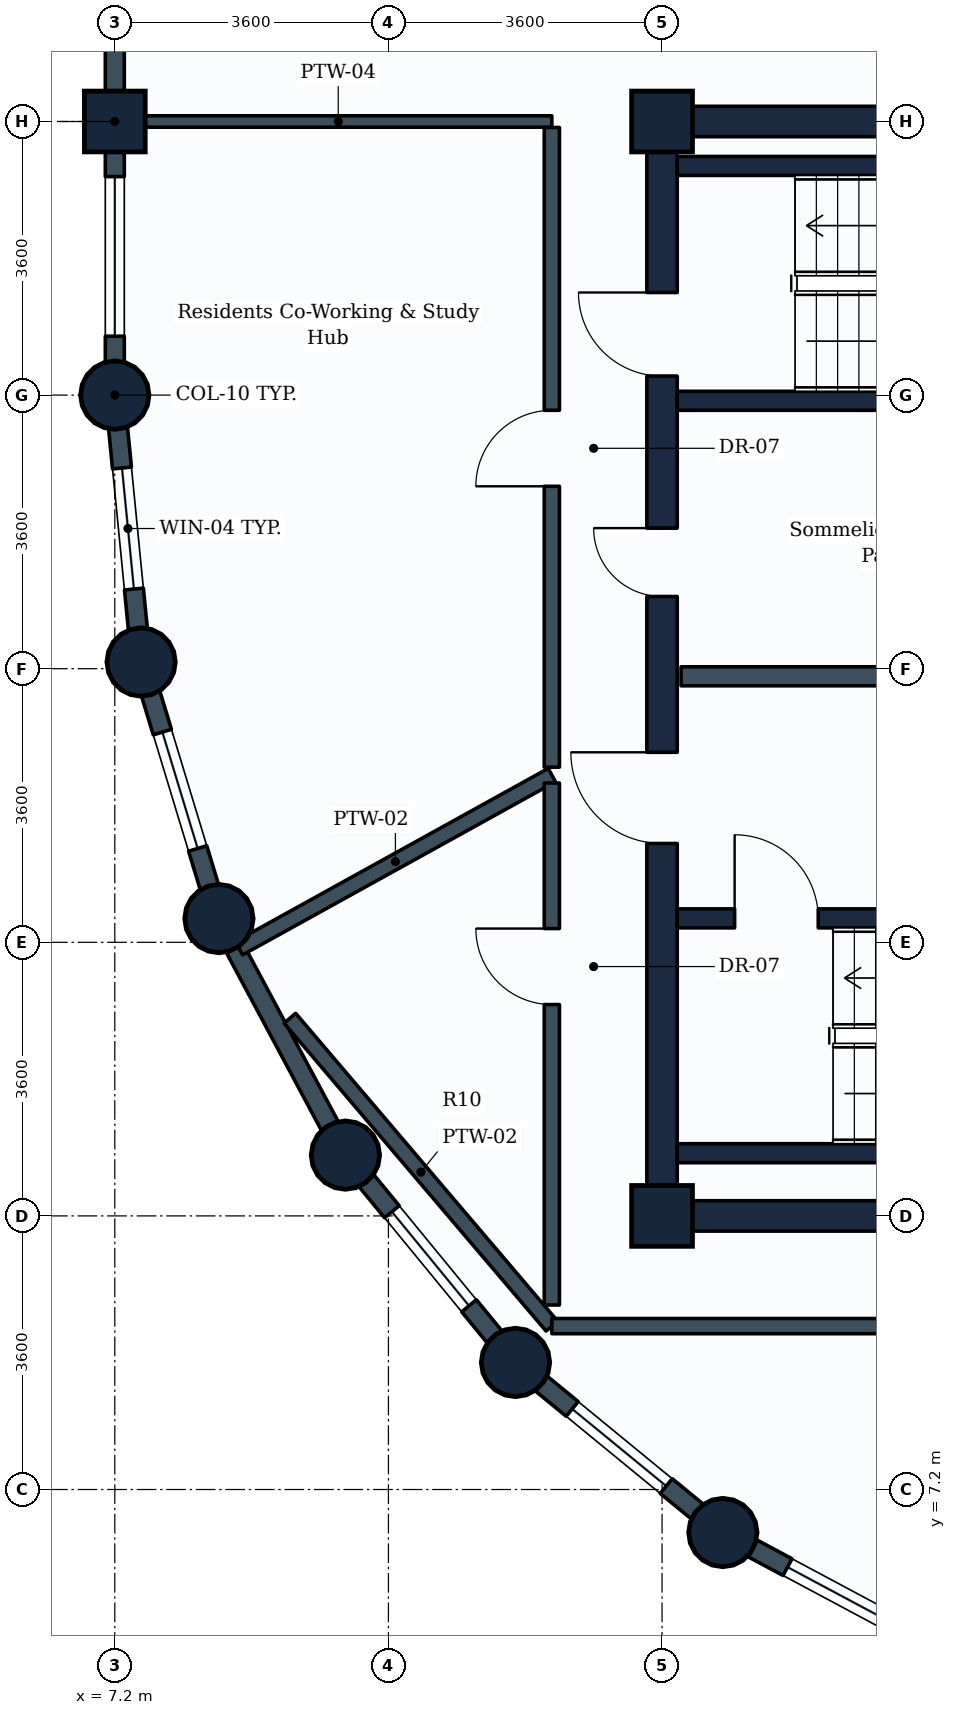
"""IFC4 building model, lengths in metres.
Left out: names, types, materials, properties, quantities, classifications, styles, units other than length and angle.
Written with IfcOpenShell. Run it as: python <this file> out.ifc"""

import sys

from ifc_helpers import new_model, si_unit, direction, frame, frame_2d, origin, origin_2d, place, context, subcontext, project, spatial, rectangle, circle, extrude, element, fill, save


model = new_model("IFC4")
c1 = context("Model", 3, precision=1e-05, world=origin(), true_north=direction((0.0, 1.0)))
c2 = subcontext(c1, "Body", "Model", "MODEL_VIEW")
j1 = project(units=[si_unit("LENGTHUNIT", "METRE"), si_unit("PLANEANGLEUNIT", "RADIAN")], contexts=[c1])
p1 = place(None, origin())
s1 = spatial("IfcSite", under=j1, at=p1, CompositionType="ELEMENT")
p2 = place(p1, origin())
s2 = spatial("IfcBuilding", under=s1, at=p2, CompositionType="ELEMENT")
p3 = place(p2, frame((0.0, 0.0, 277.4)))
s3 = spatial("IfcBuildingStorey", under=s2, at=p3, CompositionType="ELEMENT", Elevation=277.4)
p4 = place(p3, frame((7.2, 21.6, 0.0), z_axis=(0.0, 0.0, 1.0), x_axis=(1.0, 0.0, 0.0)))
e1 = element("IfcColumn", 1, at=p4, inside=s3, PredefinedType="COLUMN", context=c2, shape_type="SweptSolid", body=[
    extrude(circle(Radius=0.45, at=origin_2d()), origin(), (0.0, 0.0, 1.0), 3.6),
])
p5 = place(p3, frame((7.2, 25.2, 0.0), z_axis=(0.0, 0.0, 1.0), x_axis=(0.0, 1.0, 0.0)))
e2 = element("IfcColumn", 2, at=p5, inside=s3, PredefinedType="COLUMN", context=c2, shape_type="SweptSolid", body=[
    extrude(rectangle(XDim=0.8, YDim=0.8, at=origin_2d()), origin(), (0.0, 0.0, 1.0), 3.6),
])
for number, where, z_axis, x_axis in (
    (3, (7.546, 18.088, 0.0), (0.0, 0.0, 1.0), (1.0, 0.0, 0.0)),
    (4, (8.57, 14.712, 0.0), (0.0, 0.0, 1.0), (1.0, 0.0, 0.0)),
    (5, (10.234, 11.6, 0.0), (0.0, 0.0, 1.0), (1.0, 0.0, 0.0)),
    (6, (12.472, 8.872, 0.0), (0.0, 0.0, 1.0), (1.0, 0.0, 0.0)),
):
    element("IfcColumn", number, at=place(p3, frame(where, z_axis=z_axis, x_axis=x_axis)), inside=s3, PredefinedType="COLUMN", context=c2, shape_type="SweptSolid", body=[
        extrude(circle(Radius=0.45, at=origin_2d()), origin(), (0.0, 0.0, 1.0), 3.6),
    ])
for number, where, z_axis, x_axis in (
    (7, (14.4, 10.8, 0.0), (0.0, 0.0, 1.0), (1.0, 0.0, 0.0)),
    (8, (14.4, 25.2, 0.0), (0.0, 0.0, 1.0), (1.0, 0.0, 0.0)),
):
    element("IfcColumn", number, at=place(p3, frame(where, z_axis=z_axis, x_axis=x_axis)), inside=s3, PredefinedType="COLUMN", context=c2, shape_type="SweptSolid", body=[
        extrude(rectangle(XDim=0.8, YDim=0.8, at=origin_2d()), origin(), (0.0, 0.0, 1.0), 3.6),
    ])
p6 = place(p3, frame((15.2, 6.634, 0.0), z_axis=(0.0, 0.0, 1.0), x_axis=(1.0, 0.0, 0.0)))
e9 = element("IfcColumn", 9, at=p6, inside=s3, PredefinedType="COLUMN", context=c2, shape_type="SweptSolid", body=[
    extrude(circle(Radius=0.45, at=origin_2d()), origin(), (0.0, 0.0, 1.0), 3.6),
])
p7 = place(p3, frame((7.2, 25.2, 0.0), z_axis=(0.0, 0.0, 1.0), x_axis=(0.0, 1.0, 0.0)))
e10 = element("IfcWall", 10, at=p7, inside=s3, PredefinedType="STANDARD", context=c2, shape_type="SweptSolid", body=[
    extrude(rectangle(XDim=3.6, YDim=0.25, at=frame_2d((1.8, 0.0))), origin(), (0.0, 0.0, 1.0), 2.83),
])
p8 = place(p3, frame((7.2, 21.6, 0.0), z_axis=(0.0, 0.0, 1.0), x_axis=(0.0, 1.0, 0.0)))
e11 = element("IfcWall", 11, at=p8, inside=s3, PredefinedType="STANDARD", context=c2, shape_type="SweptSolid", body=[
    extrude(rectangle(XDim=3.6, YDim=0.25, at=frame_2d((1.8, 0.0))), origin(), (0.0, 0.0, 1.0), 2.83),
])
p9 = place(p8, frame((0.775, 0.0, 0.85)))
e12 = element("IfcOpeningElement", 12, at=p9, cuts=e11, PredefinedType="OPENING", context=c2, shape_type="SweptSolid", body=[
    extrude(rectangle(XDim=2.1, YDim=1.35, at=frame_2d((1.05, 0.675))), frame((0.0, 0.135, 0.0), z_axis=(0.0, -1.0, 0.0), x_axis=(1.0, 0.0, 0.0)), (0.0, 0.0, 1.0), 0.27),
])
p10 = place(p3, frame((7.546, 18.088, 0.0), z_axis=(0.0, 0.0, 1.0), x_axis=(-0.09802417461, 0.995184033831, 0.0)))
e13 = element("IfcWall", 13, at=p10, inside=s3, PredefinedType="STANDARD", context=c2, shape_type="SweptSolid", body=[
    extrude(rectangle(XDim=3.529, YDim=0.25, at=frame_2d((1.765, 0.0))), origin(), (0.0, 0.0, 1.0), 2.83),
])
p11 = place(p10, frame((0.965, 0.0, 0.85)))
e14 = element("IfcOpeningElement", 14, at=p11, cuts=e13, PredefinedType="OPENING", context=c2, shape_type="SweptSolid", body=[
    extrude(rectangle(XDim=1.6, YDim=1.35, at=frame_2d((0.8, 0.675))), frame((0.0, 0.135, 0.0), z_axis=(0.0, -1.0, 0.0), x_axis=(1.0, 0.0, 0.0)), (0.0, 0.0, 1.0), 0.27),
])
p12 = place(p3, frame((8.57, 14.712, 0.0), z_axis=(0.0, 0.0, 1.0), x_axis=(-0.290305086481, 0.956934144423, 0.0)))
e15 = element("IfcWall", 15, at=p12, inside=s3, PredefinedType="STANDARD", context=c2, shape_type="SweptSolid", body=[
    extrude(rectangle(XDim=3.528, YDim=0.25, at=frame_2d((1.764, 0.0))), origin(), (0.0, 0.0, 1.0), 2.83),
])
p13 = place(p12, frame((0.964, 0.0, 0.85)))
e16 = element("IfcOpeningElement", 16, at=p13, cuts=e15, PredefinedType="OPENING", context=c2, shape_type="SweptSolid", body=[
    extrude(rectangle(XDim=1.6, YDim=1.35, at=frame_2d((0.8, 0.675))), frame((0.0, 0.135, 0.0), z_axis=(0.0, -1.0, 0.0), x_axis=(1.0, 0.0, 0.0)), (0.0, 0.0, 1.0), 0.27),
])
p14 = place(p3, frame((10.234, 11.6, 0.0), z_axis=(0.0, 0.0, 1.0), x_axis=(-0.47151087309, 0.881860247748, 0.0)))
e17 = element("IfcWall", 17, at=p14, inside=s3, PredefinedType="STANDARD", context=c2, shape_type="SweptSolid", body=[
    extrude(rectangle(XDim=3.529, YDim=0.25, at=frame_2d((1.764, 0.0))), origin(), (0.0, 0.0, 1.0), 2.83),
])
p15 = place(p3, frame((12.472, 8.872, 0.0), z_axis=(0.0, 0.0, 1.0), x_axis=(-0.634258295121, 0.773121216285, 0.0)))
e18 = element("IfcWall", 18, at=p15, inside=s3, PredefinedType="STANDARD", context=c2, shape_type="SweptSolid", body=[
    extrude(rectangle(XDim=3.529, YDim=0.25, at=frame_2d((1.764, 0.0))), origin(), (0.0, 0.0, 1.0), 2.83),
])
p16 = place(p15, frame((0.964, 0.0, 0.85)))
e19 = element("IfcOpeningElement", 19, at=p16, cuts=e18, PredefinedType="OPENING", context=c2, shape_type="SweptSolid", body=[
    extrude(rectangle(XDim=1.6, YDim=1.35, at=frame_2d((0.8, 0.675))), frame((0.0, 0.135, 0.0), z_axis=(0.0, -1.0, 0.0), x_axis=(1.0, 0.0, 0.0)), (0.0, 0.0, 1.0), 0.27),
])
p17 = place(p3, frame((15.2, 6.634, 0.0), z_axis=(0.0, 0.0, 1.0), x_axis=(-0.773121216285, 0.634258295121, 0.0)))
e20 = element("IfcWall", 20, at=p17, inside=s3, PredefinedType="STANDARD", context=c2, shape_type="SweptSolid", body=[
    extrude(rectangle(XDim=3.529, YDim=0.25, at=frame_2d((1.764, 0.0))), origin(), (0.0, 0.0, 1.0), 2.83),
])
p18 = place(p17, frame((0.964, 0.0, 0.85)))
e21 = element("IfcOpeningElement", 21, at=p18, cuts=e20, PredefinedType="OPENING", context=c2, shape_type="SweptSolid", body=[
    extrude(rectangle(XDim=1.6, YDim=1.35, at=frame_2d((0.8, 0.675))), frame((0.0, 0.135, 0.0), z_axis=(0.0, -1.0, 0.0), x_axis=(1.0, 0.0, 0.0)), (0.0, 0.0, 1.0), 0.27),
])
p19 = place(p3, frame((18.312, 4.97, 0.0), z_axis=(0.0, 0.0, 1.0), x_axis=(-0.881846862014, 0.471535907389, 0.0)))
e22 = element("IfcWall", 22, at=p19, inside=s3, PredefinedType="STANDARD", context=c2, shape_type="SweptSolid", body=[
    extrude(rectangle(XDim=3.529, YDim=0.25, at=frame_2d((1.765, 0.0))), origin(), (0.0, 0.0, 1.0), 2.83),
])
p20 = place(p19, frame((0.964, 0.0, 0.85)))
e23 = element("IfcOpeningElement", 23, at=p20, cuts=e22, PredefinedType="OPENING", context=c2, shape_type="SweptSolid", body=[
    extrude(rectangle(XDim=1.6, YDim=1.35, at=frame_2d((0.8, 0.675))), frame((0.0, 0.135, 0.0), z_axis=(0.0, -1.0, 0.0), x_axis=(1.0, 0.0, 0.0)), (0.0, 0.0, 1.0), 0.27),
])
p21 = place(p3, frame((14.4, 10.8, 0.0), z_axis=(0.0, 0.0, 1.0), x_axis=(1.0, 0.0, 0.0)))
e24 = element("IfcWall", 24, at=p21, inside=s3, PredefinedType="SHEAR", context=c2, shape_type="SweptSolid", body=[
    extrude(rectangle(XDim=18.0, YDim=0.4, at=frame_2d((9.0, 0.0))), origin(), (0.0, 0.0, 1.0), 3.35),
])
p22 = place(p3, frame((14.4, 25.2, 0.0), z_axis=(0.0, 0.0, 1.0), x_axis=(1.0, 0.0, 0.0)))
e25 = element("IfcWall", 25, at=p22, inside=s3, PredefinedType="SHEAR", context=c2, shape_type="SweptSolid", body=[
    extrude(rectangle(XDim=10.8, YDim=0.4, at=frame_2d((5.4, 0.0))), origin(), (0.0, 0.0, 1.0), 3.35),
])
p23 = place(p3, frame((14.4, 10.8, 0.0), z_axis=(0.0, 0.0, 1.0), x_axis=(0.0, 1.0, 0.0)))
e26 = element("IfcWall", 26, at=p23, inside=s3, PredefinedType="SHEAR", context=c2, shape_type="SweptSolid", body=[
    extrude(rectangle(XDim=14.4, YDim=0.4, at=frame_2d((7.2, 0.0))), origin(), (0.0, 0.0, 1.0), 3.35),
])
p24 = place(p23, frame((11.05, 0.0, 0.0)))
e27 = element("IfcOpeningElement", 27, at=p24, cuts=e26, PredefinedType="OPENING", context=c2, shape_type="SweptSolid", body=[
    extrude(rectangle(XDim=1.1, YDim=2.1, at=frame_2d((0.55, 1.05))), frame((0.0, 0.21, 0.0), z_axis=(0.0, -1.0, 0.0), x_axis=(1.0, 0.0, 0.0)), (0.0, 0.0, 1.0), 0.42),
])
p25 = place(p23, frame((4.9, 0.0, 0.0)))
e28 = element("IfcOpeningElement", 28, at=p25, cuts=e26, PredefinedType="OPENING", context=c2, shape_type="SweptSolid", body=[
    extrude(rectangle(XDim=1.2, YDim=2.1, at=frame_2d((0.6, 1.05))), frame((0.0, 0.21, 0.0), z_axis=(0.0, -1.0, 0.0), x_axis=(1.0, 0.0, 0.0)), (0.0, 0.0, 1.0), 0.42),
])
p26 = place(p23, frame((8.15, 0.0, 0.0)))
e29 = element("IfcOpeningElement", 29, at=p26, cuts=e26, PredefinedType="OPENING", context=c2, shape_type="SweptSolid", body=[
    extrude(rectangle(XDim=0.9, YDim=2.1, at=frame_2d((0.45, 1.05))), frame((0.0, 0.21, 0.0), z_axis=(0.0, -1.0, 0.0), x_axis=(1.0, 0.0, 0.0)), (0.0, 0.0, 1.0), 0.42),
])
p27 = place(p3, frame((14.6, 11.625, 0.0), z_axis=(0.0, 0.0, 1.0), x_axis=(1.0, 0.0, 0.0)))
e30 = element("IfcWall", 30, at=p27, inside=s3, PredefinedType="SHEAR", context=c2, shape_type="SweptSolid", body=[
    extrude(rectangle(XDim=8.75, YDim=0.25, at=frame_2d((4.375, 0.0))), origin(), (0.0, 0.0, 1.0), 3.35),
])
p28 = place(p3, frame((14.6, 14.715, 0.0), z_axis=(0.0, 0.0, 1.0), x_axis=(1.0, 0.0, 0.0)))
e31 = element("IfcWall", 31, at=p28, inside=s3, PredefinedType="SHEAR", context=c2, shape_type="SweptSolid", body=[
    extrude(rectangle(XDim=8.75, YDim=0.25, at=frame_2d((4.375, 0.0))), origin(), (0.0, 0.0, 1.0), 3.35),
])
p29 = place(p28, frame((0.755, 0.0, 0.0)))
e32 = element("IfcOpeningElement", 32, at=p29, cuts=e31, PredefinedType="OPENING", context=c2, shape_type="SweptSolid", body=[
    extrude(rectangle(XDim=1.1, YDim=2.1, at=frame_2d((0.55, 1.05))), frame((0.0, 0.135, 0.0), z_axis=(0.0, -1.0, 0.0), x_axis=(1.0, 0.0, 0.0)), (0.0, 0.0, 1.0), 0.27),
])
for number, where, z_axis, x_axis in (
    (33, (14.6, 21.525, 0.0), (0.0, 0.0, 1.0), (1.0, 0.0, 0.0)),
    (34, (14.6, 24.615, 0.0), (0.0, 0.0, 1.0), (1.0, 0.0, 0.0)),
):
    element("IfcWall", number, at=place(p3, frame(where, z_axis=z_axis, x_axis=x_axis)), inside=s3, PredefinedType="SHEAR", context=c2, shape_type="SweptSolid", body=[
        extrude(rectangle(XDim=8.3, YDim=0.25, at=frame_2d((4.15, 0.0))), origin(), (0.0, 0.0, 1.0), 3.35),
    ])
p30 = place(p3, frame((14.65, 17.9, 0.0), z_axis=(0.0, 0.0, 1.0), x_axis=(1.0, 0.0, 0.0)))
e35 = element("IfcWall", 35, at=p30, inside=s3, PredefinedType="PARTITIONING", context=c2, shape_type="SweptSolid", body=[
    extrude(rectangle(XDim=7.15, YDim=0.25, at=frame_2d((3.575, 0.0))), origin(), (0.0, 0.0, 1.0), 3.335),
])
p31 = place(p3, frame((7.329, 25.2, 0.0), z_axis=(0.0, 0.0, 1.0), x_axis=(1.0, 0.0, 0.0)))
e36 = element("IfcWall", 36, at=p31, inside=s3, PredefinedType="PARTITIONING", context=c2, shape_type="SweptSolid", body=[
    extrude(rectangle(XDim=5.621, YDim=0.15, at=frame_2d((2.811, 0.0))), origin(), (0.0, 0.0, 1.0), 3.335),
])
p32 = place(p3, frame((12.95, 9.35, 0.0), z_axis=(0.0, 0.0, 1.0), x_axis=(-0.648016103597, 0.761626633908, 0.0)))
e37 = element("IfcWall", 37, at=p32, inside=s3, PredefinedType="PARTITIONING", context=c2, shape_type="SweptSolid", body=[
    extrude(rectangle(XDim=5.319, YDim=0.2, at=frame_2d((2.659, 0.0))), origin(), (0.0, 0.0, 1.0), 2.83),
])
p33 = place(p3, frame((12.95, 16.6, 0.0), z_axis=(0.0, 0.0, 1.0), x_axis=(-0.874941893529, -0.484227924586, 0.0)))
e38 = element("IfcWall", 38, at=p33, inside=s3, PredefinedType="PARTITIONING", context=c2, shape_type="SweptSolid", body=[
    extrude(rectangle(XDim=4.705, YDim=0.2, at=frame_2d((2.352, 0.0))), origin(), (0.0, 0.0, 1.0), 2.83),
])
p34 = place(p3, frame((12.95, 16.704, 0.0), z_axis=(0.0, 0.0, 1.0), x_axis=(0.0, 1.0, 0.0)))
e39 = element("IfcWall", 39, at=p34, inside=s3, PredefinedType="PARTITIONING", context=c2, shape_type="SweptSolid", body=[
    extrude(rectangle(XDim=8.417, YDim=0.2, at=frame_2d((4.208, 0.0))), origin(), (0.0, 0.0, 1.0), 3.02),
])
p35 = place(p34, frame((3.696, 0.0, 0.0)))
e40 = element("IfcOpeningElement", 40, at=p35, cuts=e39, PredefinedType="OPENING", context=c2, shape_type="SweptSolid", body=[
    extrude(rectangle(XDim=1.0, YDim=2.1, at=frame_2d((0.5, 1.05))), frame((0.0, 0.11, 0.0), z_axis=(0.0, -1.0, 0.0), x_axis=(1.0, 0.0, 0.0)), (0.0, 0.0, 1.0), 0.22),
])
p36 = place(p3, frame((12.95, 9.628, 0.0), z_axis=(0.0, 0.0, 1.0), x_axis=(0.0, 1.0, 0.0)))
e41 = element("IfcWall", 41, at=p36, inside=s3, PredefinedType="PARTITIONING", context=c2, shape_type="SweptSolid", body=[
    extrude(rectangle(XDim=6.868, YDim=0.2, at=frame_2d((3.434, 0.0))), origin(), (0.0, 0.0, 1.0), 3.03),
])
p37 = place(p36, frame((3.953, 0.0, 0.0)))
e42 = element("IfcOpeningElement", 42, at=p37, cuts=e41, PredefinedType="OPENING", context=c2, shape_type="SweptSolid", body=[
    extrude(rectangle(XDim=1.0, YDim=2.1, at=frame_2d((0.5, 1.05))), frame((0.0, 0.11, 0.0), z_axis=(0.0, -1.0, 0.0), x_axis=(1.0, 0.0, 0.0)), (0.0, 0.0, 1.0), 0.22),
])
p38 = place(p3, frame((12.95, 9.35, 0.0), z_axis=(0.0, 0.0, 1.0), x_axis=(1.0, 0.0, 0.0)))
e43 = element("IfcWall", 43, at=p38, inside=s3, PredefinedType="PARTITIONING", context=c2, shape_type="SweptSolid", body=[
    extrude(rectangle(XDim=15.771, YDim=0.2, at=frame_2d((7.885, 0.0))), origin(), (0.0, 0.0, 1.0), 3.02),
])
p39 = place(p38, frame((4.836, 0.0, 0.0)))
e44 = element("IfcOpeningElement", 44, at=p39, cuts=e43, PredefinedType="OPENING", context=c2, shape_type="SweptSolid", body=[
    extrude(rectangle(XDim=1.0, YDim=2.1, at=frame_2d((0.5, 1.05))), frame((0.0, 0.11, 0.0), z_axis=(0.0, -1.0, 0.0), x_axis=(1.0, 0.0, 0.0)), (0.0, 0.0, 1.0), 0.22),
])
p40 = place(p9, origin())
e45 = element("IfcWindow", 45, at=p40, inside=s3, PartitioningType="SINGLE_PANEL", PredefinedType="WINDOW", context=c2, shape_type="SweptSolid", body=[
    extrude(rectangle(XDim=2.1, YDim=1.35, at=frame_2d((1.05, 0.675))), frame((0.0, 0.03, 0.0), z_axis=(0.0, -1.0, 0.0), x_axis=(1.0, 0.0, 0.0)), (0.0, 0.0, 1.0), 0.06),
])
fill(e12, e45)
p41 = place(p11, origin())
e46 = element("IfcWindow", 46, at=p41, inside=s3, PartitioningType="SINGLE_PANEL", PredefinedType="WINDOW", context=c2, shape_type="SweptSolid", body=[
    extrude(rectangle(XDim=1.6, YDim=1.35, at=frame_2d((0.8, 0.675))), frame((0.0, 0.03, 0.0), z_axis=(0.0, -1.0, 0.0), x_axis=(1.0, 0.0, 0.0)), (0.0, 0.0, 1.0), 0.06),
])
fill(e14, e46)
p42 = place(p13, origin())
e47 = element("IfcWindow", 47, at=p42, inside=s3, PartitioningType="SINGLE_PANEL", PredefinedType="WINDOW", context=c2, shape_type="SweptSolid", body=[
    extrude(rectangle(XDim=1.6, YDim=1.35, at=frame_2d((0.8, 0.675))), frame((0.0, 0.03, 0.0), z_axis=(0.0, -1.0, 0.0), x_axis=(1.0, 0.0, 0.0)), (0.0, 0.0, 1.0), 0.06),
])
fill(e16, e47)
p43 = place(p16, origin())
e48 = element("IfcWindow", 48, at=p43, inside=s3, PartitioningType="SINGLE_PANEL", PredefinedType="WINDOW", context=c2, shape_type="SweptSolid", body=[
    extrude(rectangle(XDim=1.6, YDim=1.35, at=frame_2d((0.8, 0.675))), frame((0.0, 0.03, 0.0), z_axis=(0.0, -1.0, 0.0), x_axis=(1.0, 0.0, 0.0)), (0.0, 0.0, 1.0), 0.06),
])
fill(e19, e48)
p44 = place(p18, origin())
e49 = element("IfcWindow", 49, at=p44, inside=s3, PartitioningType="SINGLE_PANEL", PredefinedType="WINDOW", context=c2, shape_type="SweptSolid", body=[
    extrude(rectangle(XDim=1.6, YDim=1.35, at=frame_2d((0.8, 0.675))), frame((0.0, 0.03, 0.0), z_axis=(0.0, -1.0, 0.0), x_axis=(1.0, 0.0, 0.0)), (0.0, 0.0, 1.0), 0.06),
])
fill(e21, e49)
p45 = place(p20, origin())
e50 = element("IfcWindow", 50, at=p45, inside=s3, PartitioningType="SINGLE_PANEL", PredefinedType="WINDOW", context=c2, shape_type="SweptSolid", body=[
    extrude(rectangle(XDim=1.6, YDim=1.35, at=frame_2d((0.8, 0.675))), frame((0.0, 0.03, 0.0), z_axis=(0.0, -1.0, 0.0), x_axis=(1.0, 0.0, 0.0)), (0.0, 0.0, 1.0), 0.06),
])
fill(e23, e50)
p46 = place(p29, origin())
e51 = element("IfcDoor", 51, at=p46, inside=s3, OperationType="SINGLE_SWING_LEFT", PredefinedType="DOOR", context=c2, shape_type="SweptSolid", body=[
    extrude(rectangle(XDim=1.1, YDim=2.1, at=frame_2d((0.55, 1.05))), frame((0.0, 0.025, 0.0), z_axis=(0.0, -1.0, 0.0), x_axis=(1.0, 0.0, 0.0)), (0.0, 0.0, 1.0), 0.05),
])
fill(e32, e51)
p47 = place(p24, origin())
e52 = element("IfcDoor", 52, at=p47, inside=s3, OperationType="SINGLE_SWING_RIGHT", PredefinedType="DOOR", context=c2, shape_type="SweptSolid", body=[
    extrude(rectangle(XDim=1.1, YDim=2.1, at=frame_2d((0.55, 1.05))), frame((0.0, 0.025, 0.0), z_axis=(0.0, -1.0, 0.0), x_axis=(1.0, 0.0, 0.0)), (0.0, 0.0, 1.0), 0.05),
])
fill(e27, e52)
p48 = place(p25, origin())
e53 = element("IfcDoor", 53, at=p48, inside=s3, OperationType="SINGLE_SWING_RIGHT", PredefinedType="DOOR", context=c2, shape_type="SweptSolid", body=[
    extrude(rectangle(XDim=1.2, YDim=2.1, at=frame_2d((0.6, 1.05))), frame((0.0, 0.025, 0.0), z_axis=(0.0, -1.0, 0.0), x_axis=(1.0, 0.0, 0.0)), (0.0, 0.0, 1.0), 0.05),
])
fill(e28, e53)
p49 = place(p26, origin())
e54 = element("IfcDoor", 54, at=p49, inside=s3, OperationType="SINGLE_SWING_RIGHT", PredefinedType="DOOR", context=c2, shape_type="SweptSolid", body=[
    extrude(rectangle(XDim=0.9, YDim=2.1, at=frame_2d((0.45, 1.05))), frame((0.0, 0.025, 0.0), z_axis=(0.0, -1.0, 0.0), x_axis=(1.0, 0.0, 0.0)), (0.0, 0.0, 1.0), 0.05),
])
fill(e29, e54)
p50 = place(p35, origin())
e55 = element("IfcDoor", 55, at=p50, inside=s3, OperationType="SINGLE_SWING_LEFT", PredefinedType="DOOR", context=c2, shape_type="SweptSolid", body=[
    extrude(rectangle(XDim=1.0, YDim=2.1, at=frame_2d((0.5, 1.05))), frame((0.0, 0.025, 0.0), z_axis=(0.0, -1.0, 0.0), x_axis=(1.0, 0.0, 0.0)), (0.0, 0.0, 1.0), 0.05),
])
fill(e40, e55)
p51 = place(p37, origin())
e56 = element("IfcDoor", 56, at=p51, inside=s3, OperationType="SINGLE_SWING_RIGHT", PredefinedType="DOOR", context=c2, shape_type="SweptSolid", body=[
    extrude(rectangle(XDim=1.0, YDim=2.1, at=frame_2d((0.5, 1.05))), frame((0.0, 0.025, 0.0), z_axis=(0.0, -1.0, 0.0), x_axis=(1.0, 0.0, 0.0)), (0.0, 0.0, 1.0), 0.05),
])
fill(e42, e56)
save(model, sys.argv[1])
